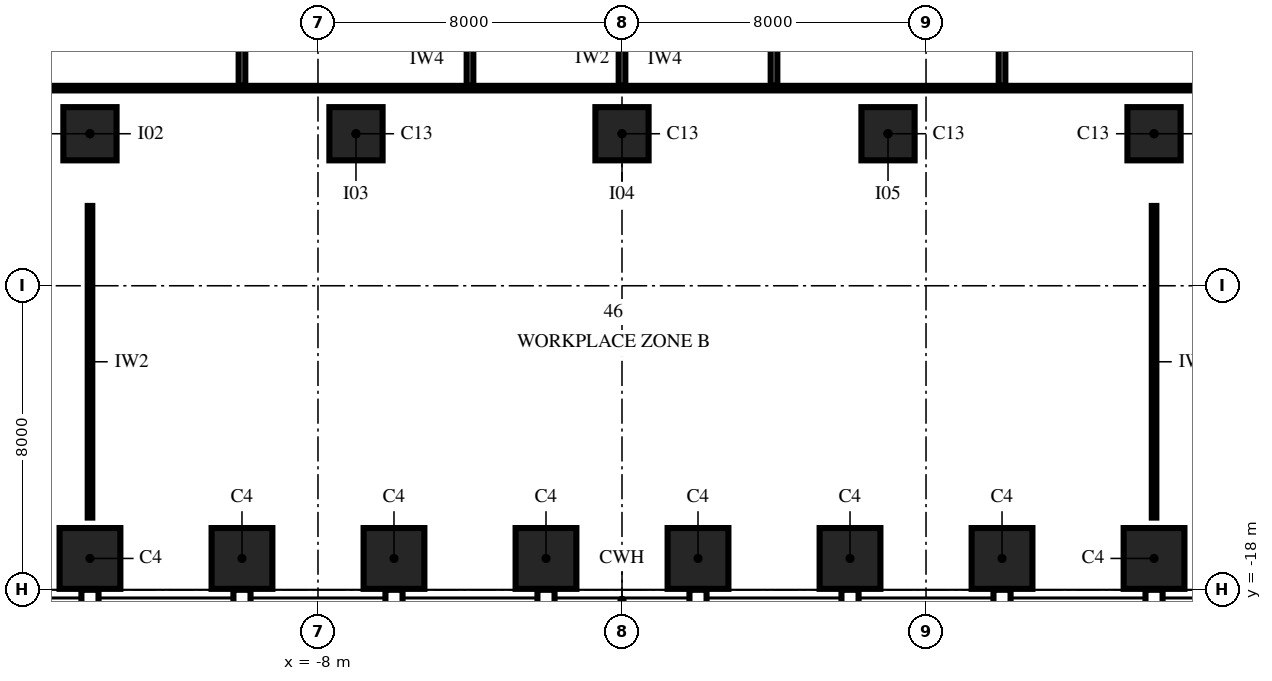
"""IFC4 building model, lengths in metres.
Left out: names, types, materials, properties, quantities, classifications, styles, units other than length and angle.
Written with IfcOpenShell. Run it as: python <this file> out.ifc"""

import sys

from ifc_helpers import new_model, si_unit, direction, frame, frame_2d, origin, origin_2d, place, context, subcontext, project, spatial, rectangle, extrude, element, save


model = new_model("IFC4")
c1 = context("Model", 3, precision=1e-05, world=origin(), true_north=direction((0.0, 1.0)))
c2 = subcontext(c1, "Body", "Model", "MODEL_VIEW")
j1 = project(units=[si_unit("LENGTHUNIT", "METRE"), si_unit("PLANEANGLEUNIT", "RADIAN")], contexts=[c1])
p1 = place(None, origin())
s1 = spatial("IfcSite", under=j1, at=p1, CompositionType="ELEMENT")
p2 = place(p1, origin())
s2 = spatial("IfcBuilding", under=s1, at=p2, CompositionType="ELEMENT")
p3 = place(p2, frame((0.0, 0.0, 182.0)))
s3 = spatial("IfcBuildingStorey", under=s2, at=p3, CompositionType="ELEMENT", Elevation=182.0)
for number, where, z_axis, x_axis in (
    (1, (-14.0, -17.175, 0.0), (0.0, 0.0, 1.0), (1.0, 0.0, 0.0)),
    (2, (-10.0, -17.175, 0.0), (0.0, 0.0, 1.0), (1.0, 0.0, 0.0)),
    (3, (-6.0, -17.175, 0.0), (0.0, 0.0, 1.0), (1.0, 0.0, 0.0)),
    (4, (-2.0, -17.175, 0.0), (0.0, 0.0, 1.0), (1.0, 0.0, 0.0)),
    (5, (2.0, -17.175, 0.0), (0.0, 0.0, 1.0), (1.0, 0.0, 0.0)),
    (6, (6.0, -17.175, 0.0), (0.0, 0.0, 1.0), (1.0, 0.0, 0.0)),
    (7, (10.0, -17.175, 0.0), (0.0, 0.0, 1.0), (1.0, 0.0, 0.0)),
    (8, (14.0, -17.175, 0.0), (0.0, 0.0, 1.0), (1.0, 0.0, 0.0)),
):
    element("IfcColumn", number, at=place(p3, frame(where, z_axis=z_axis, x_axis=x_axis)), inside=s3, PredefinedType="COLUMN", context=c2, shape_type="SweptSolid", body=[
        extrude(rectangle(XDim=1.6, YDim=1.6, at=origin_2d()), origin(), (0.0, 0.0, 1.0), 4.0),
    ])
for number, where, z_axis, x_axis in (
    (9, (-14.0, -6.0, 0.0), (0.0, 0.0, 1.0), (1.0, 0.0, 0.0)),
    (10, (-7.0, -6.0, 0.0), (0.0, 0.0, 1.0), (1.0, 0.0, 0.0)),
    (11, (0.0, -6.0, 0.0), (0.0, 0.0, 1.0), (1.0, 0.0, 0.0)),
    (12, (7.0, -6.0, 0.0), (0.0, 0.0, 1.0), (1.0, 0.0, 0.0)),
    (13, (14.0, -6.0, 0.0), (0.0, 0.0, 1.0), (1.0, 0.0, 0.0)),
):
    element("IfcColumn", number, at=place(p3, frame(where, z_axis=z_axis, x_axis=x_axis)), inside=s3, PredefinedType="COLUMN", context=c2, shape_type="SweptSolid", body=[
        extrude(rectangle(XDim=1.4, YDim=1.4, at=origin_2d()), origin(), (0.0, 0.0, 1.0), 4.0),
    ])
p4 = place(p3, frame((-16.06, -4.8, 0.0), z_axis=(0.0, 0.0, 1.0), x_axis=(1.0, 0.0, 0.0)))
e14 = element("IfcWall", 14, at=p4, inside=s3, PredefinedType="PARTITIONING", context=c2, shape_type="SweptSolid", body=[
    extrude(rectangle(XDim=32.12, YDim=0.12, at=frame_2d((16.06, 0.0))), origin(), (0.0, 0.0, 1.0), 3.25),
])
p5 = place(p3, frame((-10.0, -4.74, 0.0), z_axis=(0.0, 0.0, 1.0), x_axis=(0.0, 1.0, 0.0)))
e15 = element("IfcWall", 15, at=p5, inside=s3, PredefinedType="PARTITIONING", context=c2, shape_type="SweptSolid", body=[
    extrude(rectangle(XDim=5.28, YDim=0.175, at=frame_2d((2.64, 0.0))), origin(), (0.0, 0.0, 1.0), 3.25),
])
for number, where, z_axis, x_axis in (
    (16, (-4.0, -4.74, 0.0), (0.0, 0.0, 1.0), (0.0, 1.0, 0.0)),
    (17, (0.0, -4.74, 0.0), (0.0, 0.0, 1.0), (0.0, 1.0, 0.0)),
    (18, (4.0, -4.74, 0.0), (0.0, 0.0, 1.0), (0.0, 1.0, 0.0)),
):
    element("IfcWall", number, at=place(p3, frame(where, z_axis=z_axis, x_axis=x_axis)), inside=s3, PredefinedType="PARTITIONING", context=c2, shape_type="SweptSolid", body=[
        extrude(rectangle(XDim=3.68, YDim=0.175, at=frame_2d((1.84, 0.0))), origin(), (0.0, 0.0, 1.0), 3.85),
    ])
p6 = place(p3, frame((10.0, -4.74, 0.0), z_axis=(0.0, 0.0, 1.0), x_axis=(0.0, 1.0, 0.0)))
e19 = element("IfcWall", 19, at=p6, inside=s3, PredefinedType="PARTITIONING", context=c2, shape_type="SweptSolid", body=[
    extrude(rectangle(XDim=5.28, YDim=0.175, at=frame_2d((2.64, 0.0))), origin(), (0.0, 0.0, 1.0), 3.25),
])
for number, where, z_axis, x_axis in (
    (20, (-13.999, -16.1, 0.0), (0.0, 0.0, 1.0), (0.0, 1.0, 0.0)),
    (21, (14.001, -16.1, 0.0), (0.0, 0.0, 1.0), (0.0, 1.0, 0.0)),
):
    element("IfcWall", number, at=place(p3, frame(where, z_axis=z_axis, x_axis=x_axis)), inside=s3, PredefinedType="PARTITIONING", context=c2, shape_type="SweptSolid", body=[
        extrude(rectangle(XDim=8.2, YDim=0.12, at=frame_2d((4.1, 0.0))), origin(), (0.0, 0.0, 1.0), 3.25),
    ])
save(model, sys.argv[1])
